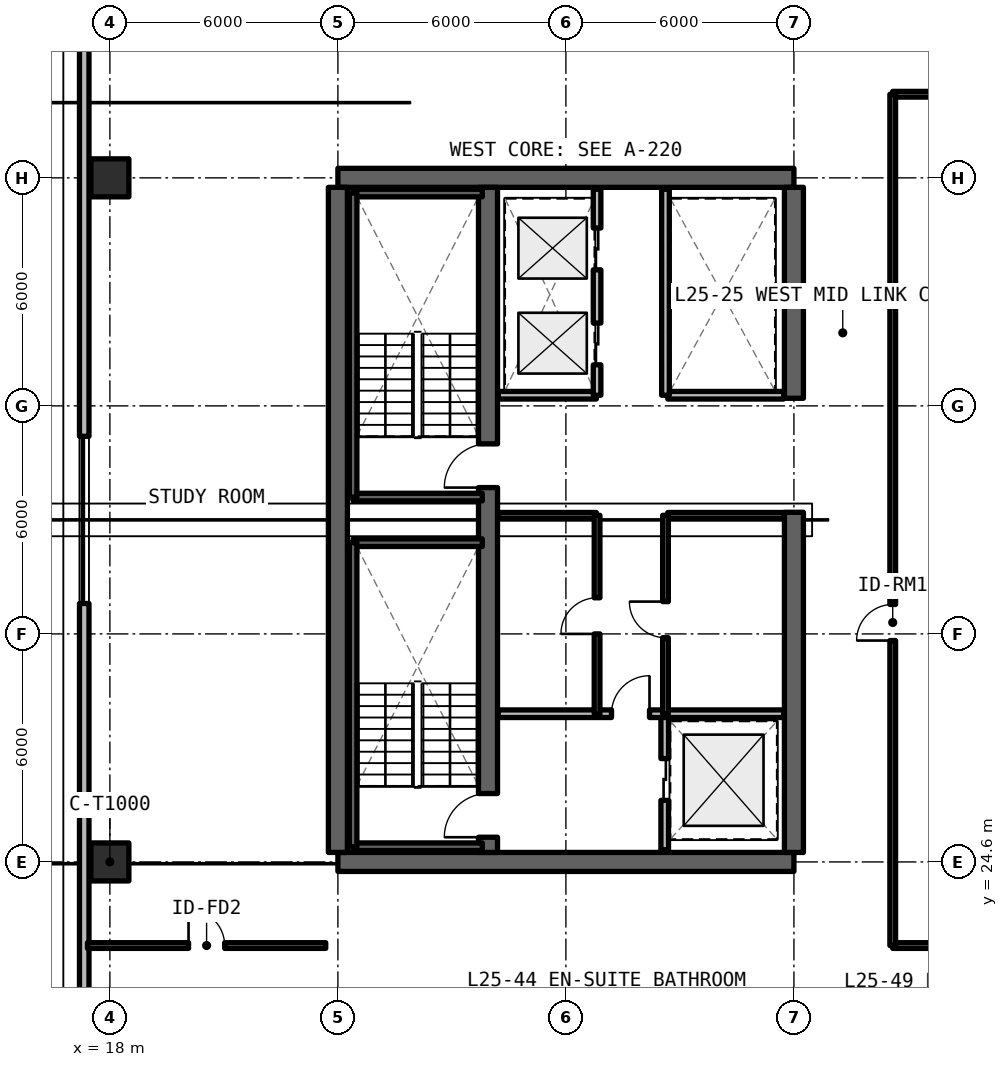
"""IFC4 building model, lengths in metres.
Left out: names, types, materials, properties, quantities, classifications, styles, units other than length and angle.
Written with IfcOpenShell. Run it as: python <this file> out.ifc"""

import sys

from ifc_helpers import new_model, si_unit, direction, frame, frame_2d, origin, origin_2d, place, context, subcontext, project, spatial, rectangle, extrude, element, fill, save


model = new_model("IFC4")
c1 = context("Model", 3, precision=1e-05, world=origin(), true_north=direction((0.0, 1.0)))
c2 = subcontext(c1, "Body", "Model", "MODEL_VIEW")
j1 = project(units=[si_unit("LENGTHUNIT", "METRE"), si_unit("PLANEANGLEUNIT", "RADIAN")], contexts=[c1])
p1 = place(None, origin())
s1 = spatial("IfcSite", under=j1, at=p1, CompositionType="ELEMENT")
p2 = place(p1, origin())
s2 = spatial("IfcBuilding", under=s1, at=p2, CompositionType="ELEMENT")
p3 = place(p2, frame((0.0, 0.0, 92.07)))
s3 = spatial("IfcBuildingStorey", under=s2, at=p3, CompositionType="ELEMENT", Elevation=92.07)
for number, where, z_axis, x_axis in (
    (1, (24.0, 24.6, 0.0), (0.0, 0.0, 1.0), (1.0, 0.0, 0.0)),
    (2, (36.0, 42.6, 0.0), (0.0, 0.0, 1.0), (-1.0, 0.0, 0.0)),
):
    element("IfcWall", number, at=place(p3, frame(where, z_axis=z_axis, x_axis=x_axis)), inside=s3, PredefinedType="SHEAR", context=c2, shape_type="SweptSolid", body=[
        extrude(rectangle(XDim=12.0, YDim=0.5, at=frame_2d((6.0, 0.0))), origin(), (0.0, 0.0, 1.0), 3.3),
    ])
p4 = place(p3, frame((24.0, 24.85, 0.0), z_axis=(0.0, 0.0, 1.0), x_axis=(0.0, 1.0, 0.0)))
e3 = element("IfcWall", 3, at=p4, inside=s3, PredefinedType="SHEAR", context=c2, shape_type="SweptSolid", body=[
    extrude(rectangle(XDim=17.5, YDim=0.5, at=frame_2d((8.75, 0.0))), origin(), (0.0, 0.0, 1.0), 3.3),
])
p5 = place(p3, frame((36.0, 24.85, 0.0), z_axis=(0.0, 0.0, 1.0), x_axis=(0.0, 1.0, 0.0)))
e4 = element("IfcWall", 4, at=p5, inside=s3, PredefinedType="SHEAR", context=c2, shape_type="SweptSolid", body=[
    extrude(rectangle(XDim=8.95, YDim=0.5, at=frame_2d((4.475, 0.0))), origin(), (0.0, 0.0, 1.0), 3.3),
])
p6 = place(p3, frame((36.0, 36.8, 0.0), z_axis=(0.0, 0.0, 1.0), x_axis=(0.0, 1.0, 0.0)))
e5 = element("IfcWall", 5, at=p6, inside=s3, PredefinedType="SHEAR", context=c2, shape_type="SweptSolid", body=[
    extrude(rectangle(XDim=5.55, YDim=0.5, at=frame_2d((2.775, 0.0))), origin(), (0.0, 0.0, 1.0), 3.3),
])
p7 = place(p3, frame((27.95, 24.85, 0.0), z_axis=(0.0, 0.0, 1.0), x_axis=(0.0, 1.0, 0.0)))
e6 = element("IfcWall", 6, at=p7, inside=s3, PredefinedType="SHEAR", context=c2, shape_type="SweptSolid", body=[
    extrude(rectangle(XDim=17.5, YDim=0.5, at=frame_2d((8.75, 0.0))), origin(), (0.0, 0.0, 1.0), 3.3),
])
p8 = place(p7, frame((0.4, 0.0, 0.0)))
e7 = element("IfcOpeningElement", 7, at=p8, cuts=e6, PredefinedType="OPENING", context=c2, shape_type="SweptSolid", body=[
    extrude(rectangle(XDim=1.15, YDim=2.15, at=frame_2d((0.575, 1.075))), frame((0.0, 0.26, 0.0), z_axis=(0.0, -1.0, 0.0), x_axis=(1.0, 0.0, 0.0)), (0.0, 0.0, 1.0), 0.52),
])
p9 = place(p7, frame((9.6, 0.0, 0.0)))
e8 = element("IfcOpeningElement", 8, at=p9, cuts=e6, PredefinedType="OPENING", context=c2, shape_type="SweptSolid", body=[
    extrude(rectangle(XDim=1.15, YDim=2.15, at=frame_2d((0.575, 1.075))), frame((0.0, 0.26, 0.0), z_axis=(0.0, -1.0, 0.0), x_axis=(1.0, 0.0, 0.0)), (0.0, 0.0, 1.0), 0.52),
])
for number, where, z_axis, x_axis in (
    (9, (18.0, 24.6, 0.0), (0.0, 0.0, 1.0), (1.0, 0.0, 0.0)),
    (10, (18.0, 42.6, 0.0), (0.0, 0.0, 1.0), (1.0, 0.0, 0.0)),
):
    element("IfcColumn", number, at=place(p3, frame(where, z_axis=z_axis, x_axis=x_axis)), inside=s3, PredefinedType="COLUMN", context=c2, shape_type="SweptSolid", body=[
        extrude(rectangle(XDim=1.0, YDim=1.0, at=origin_2d()), origin(), (0.0, 0.0, 1.0), 3.3),
    ])
p10 = place(p3, frame((17.325, 53.348, 0.0), z_axis=(0.0, 0.0, 1.0), x_axis=(0.0, -1.0, 0.0)))
e11 = element("IfcWall", 11, at=p10, inside=s3, PredefinedType="SOLIDWALL", context=c2, shape_type="SweptSolid", body=[
    extrude(rectangle(XDim=39.496, YDim=0.25, at=frame_2d((19.748, 0.0))), origin(), (0.0, 0.0, 1.0), 3.08),
])
p11 = place(p10, frame((17.548, 0.0, 0.78)))
e12 = element("IfcOpeningElement", 12, at=p11, cuts=e11, PredefinedType="OPENING", context=c2, shape_type="SweptSolid", body=[
    extrude(rectangle(XDim=4.4, YDim=1.66, at=frame_2d((2.2, 0.83))), frame((0.0, 0.135, 0.0), z_axis=(0.0, -1.0, 0.0), x_axis=(1.0, 0.0, 0.0)), (0.0, 0.0, 1.0), 0.27),
])
p12 = place(p10, frame((35.642, 0.0, 0.78)))
e13 = element("IfcOpeningElement", 13, at=p12, cuts=e11, PredefinedType="OPENING", context=c2, shape_type="SweptSolid", body=[
    extrude(rectangle(XDim=1.4, YDim=1.65, at=frame_2d((0.7, 0.825))), frame((0.0, 0.135, 0.0), z_axis=(0.0, -1.0, 0.0), x_axis=(1.0, 0.0, 0.0)), (0.0, 0.0, 1.0), 0.27),
])
p13 = place(p3, frame((32.6, 24.92, 0.0), z_axis=(0.0, 0.0, 1.0), x_axis=(0.0, 1.0, 0.0)))
e14 = element("IfcWall", 14, at=p13, inside=s3, PredefinedType="SOLIDWALL", context=c2, shape_type="SweptSolid", body=[
    extrude(rectangle(XDim=3.58, YDim=0.2, at=frame_2d((1.79, 0.0))), origin(), (0.0, 0.0, 1.0), 2.35),
])
p14 = place(p13, frame((1.3, 0.0, 0.0)))
e15 = element("IfcOpeningElement", 15, at=p14, cuts=e14, PredefinedType="OPENING", context=c2, shape_type="SweptSolid", body=[
    extrude(rectangle(XDim=1.1, YDim=2.2, at=frame_2d((0.55, 1.1))), frame((0.0, 0.11, 0.0), z_axis=(0.0, -1.0, 0.0), x_axis=(1.0, 0.0, 0.0)), (0.0, 0.0, 1.0), 0.22),
])
p15 = place(p3, frame((28.22, 28.5, 0.0), z_axis=(0.0, 0.0, 1.0), x_axis=(1.0, 0.0, 0.0)))
e16 = element("IfcWall", 16, at=p15, inside=s3, PredefinedType="SOLIDWALL", context=c2, shape_type="SweptSolid", body=[
    extrude(rectangle(XDim=7.51, YDim=0.2, at=frame_2d((3.755, 0.0))), origin(), (0.0, 0.0, 1.0), 2.35),
])
p16 = place(p15, frame((2.98, 0.0, 0.0)))
e17 = element("IfcOpeningElement", 17, at=p16, cuts=e16, PredefinedType="OPENING", context=c2, shape_type="SweptSolid", body=[
    extrude(rectangle(XDim=1.0, YDim=2.15, at=frame_2d((0.5, 1.075))), frame((0.0, 0.11, 0.0), z_axis=(0.0, -1.0, 0.0), x_axis=(1.0, 0.0, 0.0)), (0.0, 0.0, 1.0), 0.22),
])
p17 = place(p3, frame((28.22, 33.72, 0.0), z_axis=(0.0, 0.0, 1.0), x_axis=(1.0, 0.0, 0.0)))
e18 = element("IfcWall", 18, at=p17, inside=s3, PredefinedType="SOLIDWALL", context=c2, shape_type="SweptSolid", body=[
    extrude(rectangle(XDim=2.58, YDim=0.15, at=frame_2d((1.29, 0.0))), origin(), (0.0, 0.0, 1.0), 2.35),
])
p18 = place(p3, frame((30.82, 28.5, 0.0), z_axis=(0.0, 0.0, 1.0), x_axis=(0.0, 1.0, 0.0)))
e19 = element("IfcWall", 19, at=p18, inside=s3, PredefinedType="SOLIDWALL", context=c2, shape_type="SweptSolid", body=[
    extrude(rectangle(XDim=5.22, YDim=0.15, at=frame_2d((2.61, 0.0))), origin(), (0.0, 0.0, 1.0), 2.35),
])
p19 = place(p18, frame((2.1, 0.0, 0.0)))
e20 = element("IfcOpeningElement", 20, at=p19, cuts=e19, PredefinedType="OPENING", context=c2, shape_type="SweptSolid", body=[
    extrude(rectangle(XDim=0.95, YDim=2.15, at=frame_2d((0.475, 1.075))), frame((0.0, 0.085, 0.0), z_axis=(0.0, -1.0, 0.0), x_axis=(1.0, 0.0, 0.0)), (0.0, 0.0, 1.0), 0.17),
])
p20 = place(p3, frame((32.68, 33.72, 0.0), z_axis=(0.0, 0.0, 1.0), x_axis=(1.0, 0.0, 0.0)))
e21 = element("IfcWall", 21, at=p20, inside=s3, PredefinedType="SOLIDWALL", context=c2, shape_type="SweptSolid", body=[
    extrude(rectangle(XDim=3.05, YDim=0.15, at=frame_2d((1.525, 0.0))), origin(), (0.0, 0.0, 1.0), 2.35),
])
p21 = place(p3, frame((32.62, 28.5, 0.0), z_axis=(0.0, 0.0, 1.0), x_axis=(0.0, 1.0, 0.0)))
e22 = element("IfcWall", 22, at=p21, inside=s3, PredefinedType="SOLIDWALL", context=c2, shape_type="SweptSolid", body=[
    extrude(rectangle(XDim=5.22, YDim=0.15, at=frame_2d((2.61, 0.0))), origin(), (0.0, 0.0, 1.0), 2.35),
])
p22 = place(p21, frame((2.0, 0.0, 0.0)))
e23 = element("IfcOpeningElement", 23, at=p22, cuts=e22, PredefinedType="OPENING", context=c2, shape_type="SweptSolid", body=[
    extrude(rectangle(XDim=0.95, YDim=2.15, at=frame_2d((0.475, 1.075))), frame((0.0, 0.085, 0.0), z_axis=(0.0, -1.0, 0.0), x_axis=(1.0, 0.0, 0.0)), (0.0, 0.0, 1.0), 0.17),
])
p23 = place(p3, frame((28.22, 36.88, 0.0), z_axis=(0.0, 0.0, 1.0), x_axis=(1.0, 0.0, 0.0)))
e24 = element("IfcWall", 24, at=p23, inside=s3, PredefinedType="SOLIDWALL", context=c2, shape_type="SweptSolid", body=[
    extrude(rectangle(XDim=2.58, YDim=0.2, at=frame_2d((1.29, 0.0))), origin(), (0.0, 0.0, 1.0), 2.35),
])
p24 = place(p3, frame((30.82, 36.88, 0.0), z_axis=(0.0, 0.0, 1.0), x_axis=(0.0, 1.0, 0.0)))
e25 = element("IfcWall", 25, at=p24, inside=s3, PredefinedType="SOLIDWALL", context=c2, shape_type="SweptSolid", body=[
    extrude(rectangle(XDim=5.42, YDim=0.2, at=frame_2d((2.71, 0.0))), origin(), (0.0, 0.0, 1.0), 2.35),
])
p25 = place(p24, frame((0.8, 0.0, 0.0)))
e26 = element("IfcOpeningElement", 26, at=p25, cuts=e25, PredefinedType="OPENING", context=c2, shape_type="SweptSolid", body=[
    extrude(rectangle(XDim=1.1, YDim=2.2, at=frame_2d((0.55, 1.1))), frame((0.0, 0.11, 0.0), z_axis=(0.0, -1.0, 0.0), x_axis=(1.0, 0.0, 0.0)), (0.0, 0.0, 1.0), 0.22),
])
p26 = place(p24, frame((3.3, 0.0, 0.0)))
e27 = element("IfcOpeningElement", 27, at=p26, cuts=e25, PredefinedType="OPENING", context=c2, shape_type="SweptSolid", body=[
    extrude(rectangle(XDim=1.1, YDim=2.2, at=frame_2d((0.55, 1.1))), frame((0.0, 0.11, 0.0), z_axis=(0.0, -1.0, 0.0), x_axis=(1.0, 0.0, 0.0)), (0.0, 0.0, 1.0), 0.22),
])
p27 = place(p3, frame((32.68, 36.88, 0.0), z_axis=(0.0, 0.0, 1.0), x_axis=(1.0, 0.0, 0.0)))
e28 = element("IfcWall", 28, at=p27, inside=s3, PredefinedType="SOLIDWALL", context=c2, shape_type="SweptSolid", body=[
    extrude(rectangle(XDim=3.05, YDim=0.2, at=frame_2d((1.525, 0.0))), origin(), (0.0, 0.0, 1.0), 2.35),
])
p28 = place(p3, frame((32.62, 36.88, 0.0), z_axis=(0.0, 0.0, 1.0), x_axis=(0.0, 1.0, 0.0)))
e29 = element("IfcWall", 29, at=p28, inside=s3, PredefinedType="SOLIDWALL", context=c2, shape_type="SweptSolid", body=[
    extrude(rectangle(XDim=5.42, YDim=0.2, at=frame_2d((2.71, 0.0))), origin(), (0.0, 0.0, 1.0), 2.35),
])
for number, where, z_axis, x_axis in (
    (30, (38.6, 22.4, 0.0), (0.0, 0.0, 1.0), (1.0, 0.0, 0.0)),
    (31, (38.6, 44.8, 0.0), (0.0, 0.0, 1.0), (1.0, 0.0, 0.0)),
):
    element("IfcWall", number, at=place(p3, frame(where, z_axis=z_axis, x_axis=x_axis)), inside=s3, PredefinedType="SOLIDWALL", context=c2, shape_type="SweptSolid", body=[
        extrude(rectangle(XDim=8.25, YDim=0.15, at=frame_2d((4.125, 0.0))), origin(), (0.0, 0.0, 1.0), 2.35),
    ])
p29 = place(p3, frame((38.6, 22.4, 0.0), z_axis=(0.0, 0.0, 1.0), x_axis=(0.0, 1.0, 0.0)))
e32 = element("IfcWall", 32, at=p29, inside=s3, PredefinedType="SOLIDWALL", context=c2, shape_type="SweptSolid", body=[
    extrude(rectangle(XDim=22.4, YDim=0.15, at=frame_2d((11.2, 0.0))), origin(), (0.0, 0.0, 1.0), 2.35),
])
p30 = place(p29, frame((8.025, 0.0, 0.0)))
e33 = element("IfcOpeningElement", 33, at=p30, cuts=e32, PredefinedType="OPENING", context=c2, shape_type="SweptSolid", body=[
    extrude(rectangle(XDim=0.95, YDim=2.15, at=frame_2d((0.475, 1.075))), frame((0.0, 0.085, 0.0), z_axis=(0.0, -1.0, 0.0), x_axis=(1.0, 0.0, 0.0)), (0.0, 0.0, 1.0), 0.17),
])
p31 = place(p3, frame((17.41, 22.4, 0.0), z_axis=(0.0, 0.0, 1.0), x_axis=(1.0, 0.0, 0.0)))
e34 = element("IfcWall", 34, at=p31, inside=s3, PredefinedType="SOLIDWALL", context=c2, shape_type="SweptSolid", body=[
    extrude(rectangle(XDim=6.27, YDim=0.15, at=frame_2d((3.135, 0.0))), origin(), (0.0, 0.0, 1.0), 2.35),
])
p32 = place(p31, frame((2.66, 0.0, 0.0)))
e35 = element("IfcOpeningElement", 35, at=p32, cuts=e34, PredefinedType="OPENING", context=c2, shape_type="SweptSolid", body=[
    extrude(rectangle(XDim=0.95, YDim=2.15, at=frame_2d((0.475, 1.075))), frame((0.0, 0.085, 0.0), z_axis=(0.0, -1.0, 0.0), x_axis=(1.0, 0.0, 0.0)), (0.0, 0.0, 1.0), 0.17),
])
for number, where, z_axis, x_axis in (
    (36, (24.4, 25.0, 0.0), (0.0, 0.0, 1.0), (1.0, 0.0, 0.0)),
    (37, (27.8, 33.0, 0.0), (0.0, 0.0, 1.0), (-1.0, 0.0, 0.0)),
):
    element("IfcWall", number, at=place(p3, frame(where, z_axis=z_axis, x_axis=x_axis)), inside=s3, PredefinedType="SOLIDWALL", context=c2, shape_type="SweptSolid", body=[
        extrude(rectangle(XDim=3.4, YDim=0.2, at=frame_2d((1.7, 0.0))), origin(), (0.0, 0.0, 1.0), 3.3),
    ])
p33 = place(p3, frame((24.4, 33.0, 0.0), z_axis=(0.0, 0.0, 1.0), x_axis=(0.0, -1.0, 0.0)))
e38 = element("IfcWall", 38, at=p33, inside=s3, PredefinedType="SOLIDWALL", context=c2, shape_type="SweptSolid", body=[
    extrude(rectangle(XDim=8.0, YDim=0.2, at=frame_2d((4.0, 0.0))), origin(), (0.0, 0.0, 1.0), 3.3),
])
for number, where, z_axis, x_axis in (
    (39, (24.4, 34.2, 0.0), (0.0, 0.0, 1.0), (1.0, 0.0, 0.0)),
    (40, (27.8, 42.2, 0.0), (0.0, 0.0, 1.0), (-1.0, 0.0, 0.0)),
):
    element("IfcWall", number, at=place(p3, frame(where, z_axis=z_axis, x_axis=x_axis)), inside=s3, PredefinedType="SOLIDWALL", context=c2, shape_type="SweptSolid", body=[
        extrude(rectangle(XDim=3.4, YDim=0.2, at=frame_2d((1.7, 0.0))), origin(), (0.0, 0.0, 1.0), 3.3),
    ])
p34 = place(p3, frame((24.4, 42.2, 0.0), z_axis=(0.0, 0.0, 1.0), x_axis=(0.0, -1.0, 0.0)))
e41 = element("IfcWall", 41, at=p34, inside=s3, PredefinedType="SOLIDWALL", context=c2, shape_type="SweptSolid", body=[
    extrude(rectangle(XDim=8.0, YDim=0.2, at=frame_2d((4.0, 0.0))), origin(), (0.0, 0.0, 1.0), 3.3),
])
p35 = place(p11, origin())
e42 = element("IfcWindow", 42, at=p35, inside=s3, PartitioningType="SINGLE_PANEL", PredefinedType="WINDOW", context=c2, shape_type="SweptSolid", body=[
    extrude(rectangle(XDim=4.4, YDim=1.66, at=frame_2d((2.2, 0.83))), frame((0.0, 0.03, 0.0), z_axis=(0.0, -1.0, 0.0), x_axis=(1.0, 0.0, 0.0)), (0.0, 0.0, 1.0), 0.06),
])
fill(e12, e42)
p36 = place(p14, origin())
e43 = element("IfcDoor", 43, at=p36, inside=s3, OperationType="SLIDING_TO_LEFT", PredefinedType="DOOR", context=c2, shape_type="SweptSolid", body=[
    extrude(rectangle(XDim=1.1, YDim=2.2, at=frame_2d((0.55, 1.1))), frame((0.0, 0.025, 0.0), z_axis=(0.0, -1.0, 0.0), x_axis=(1.0, 0.0, 0.0)), (0.0, 0.0, 1.0), 0.05),
])
fill(e15, e43)
p37 = place(p16, origin())
e44 = element("IfcDoor", 44, at=p37, inside=s3, OperationType="SINGLE_SWING_RIGHT", PredefinedType="DOOR", context=c2, shape_type="SweptSolid", body=[
    extrude(rectangle(XDim=1.0, YDim=2.15, at=frame_2d((0.5, 1.075))), frame((0.0, 0.025, 0.0), z_axis=(0.0, -1.0, 0.0), x_axis=(1.0, 0.0, 0.0)), (0.0, 0.0, 1.0), 0.05),
])
fill(e17, e44)
p38 = place(p19, origin())
e45 = element("IfcDoor", 45, at=p38, inside=s3, OperationType="SINGLE_SWING_LEFT", PredefinedType="DOOR", context=c2, shape_type="SweptSolid", body=[
    extrude(rectangle(XDim=0.95, YDim=2.15, at=frame_2d((0.475, 1.075))), frame((0.0, 0.025, 0.0), z_axis=(0.0, -1.0, 0.0), x_axis=(1.0, 0.0, 0.0)), (0.0, 0.0, 1.0), 0.05),
])
fill(e20, e45)
p39 = place(p22, origin())
e46 = element("IfcDoor", 46, at=p39, inside=s3, OperationType="SINGLE_SWING_RIGHT", PredefinedType="DOOR", context=c2, shape_type="SweptSolid", body=[
    extrude(rectangle(XDim=0.95, YDim=2.15, at=frame_2d((0.475, 1.075))), frame((0.0, 0.025, 0.0), z_axis=(0.0, -1.0, 0.0), x_axis=(1.0, 0.0, 0.0)), (0.0, 0.0, 1.0), 0.05),
])
fill(e23, e46)
p40 = place(p25, origin())
e47 = element("IfcDoor", 47, at=p40, inside=s3, OperationType="SLIDING_TO_LEFT", PredefinedType="DOOR", context=c2, shape_type="SweptSolid", body=[
    extrude(rectangle(XDim=1.1, YDim=2.2, at=frame_2d((0.55, 1.1))), frame((0.0, 0.025, 0.0), z_axis=(0.0, -1.0, 0.0), x_axis=(1.0, 0.0, 0.0)), (0.0, 0.0, 1.0), 0.05),
])
fill(e26, e47)
p41 = place(p26, origin())
e48 = element("IfcDoor", 48, at=p41, inside=s3, OperationType="SLIDING_TO_RIGHT", PredefinedType="DOOR", context=c2, shape_type="SweptSolid", body=[
    extrude(rectangle(XDim=1.1, YDim=2.2, at=frame_2d((0.55, 1.1))), frame((0.0, 0.025, 0.0), z_axis=(0.0, -1.0, 0.0), x_axis=(1.0, 0.0, 0.0)), (0.0, 0.0, 1.0), 0.05),
])
fill(e27, e48)
p42 = place(p30, origin())
e49 = element("IfcDoor", 49, at=p42, inside=s3, OperationType="SINGLE_SWING_LEFT", PredefinedType="DOOR", context=c2, shape_type="SweptSolid", body=[
    extrude(rectangle(XDim=0.95, YDim=2.15, at=frame_2d((0.475, 1.075))), frame((0.0, 0.025, 0.0), z_axis=(0.0, -1.0, 0.0), x_axis=(1.0, 0.0, 0.0)), (0.0, 0.0, 1.0), 0.05),
])
fill(e33, e49)
p43 = place(p32, origin())
e50 = element("IfcDoor", 50, at=p43, inside=s3, OperationType="SINGLE_SWING_LEFT", PredefinedType="DOOR", context=c2, shape_type="SweptSolid", body=[
    extrude(rectangle(XDim=0.95, YDim=2.15, at=frame_2d((0.475, 1.075))), frame((0.0, 0.025, 0.0), z_axis=(0.0, -1.0, 0.0), x_axis=(1.0, 0.0, 0.0)), (0.0, 0.0, 1.0), 0.05),
])
fill(e35, e50)
p44 = place(p8, origin())
e51 = element("IfcDoor", 51, at=p44, inside=s3, OperationType="SINGLE_SWING_RIGHT", PredefinedType="DOOR", context=c2, shape_type="SweptSolid", body=[
    extrude(rectangle(XDim=1.15, YDim=2.15, at=frame_2d((0.575, 1.075))), frame((0.0, 0.025, 0.0), z_axis=(0.0, -1.0, 0.0), x_axis=(1.0, 0.0, 0.0)), (0.0, 0.0, 1.0), 0.05),
])
fill(e7, e51)
p45 = place(p9, origin())
e52 = element("IfcDoor", 52, at=p45, inside=s3, OperationType="SINGLE_SWING_LEFT", PredefinedType="DOOR", context=c2, shape_type="SweptSolid", body=[
    extrude(rectangle(XDim=1.15, YDim=2.15, at=frame_2d((0.575, 1.075))), frame((0.0, 0.025, 0.0), z_axis=(0.0, -1.0, 0.0), x_axis=(1.0, 0.0, 0.0)), (0.0, 0.0, 1.0), 0.05),
])
fill(e8, e52)
save(model, sys.argv[1])
